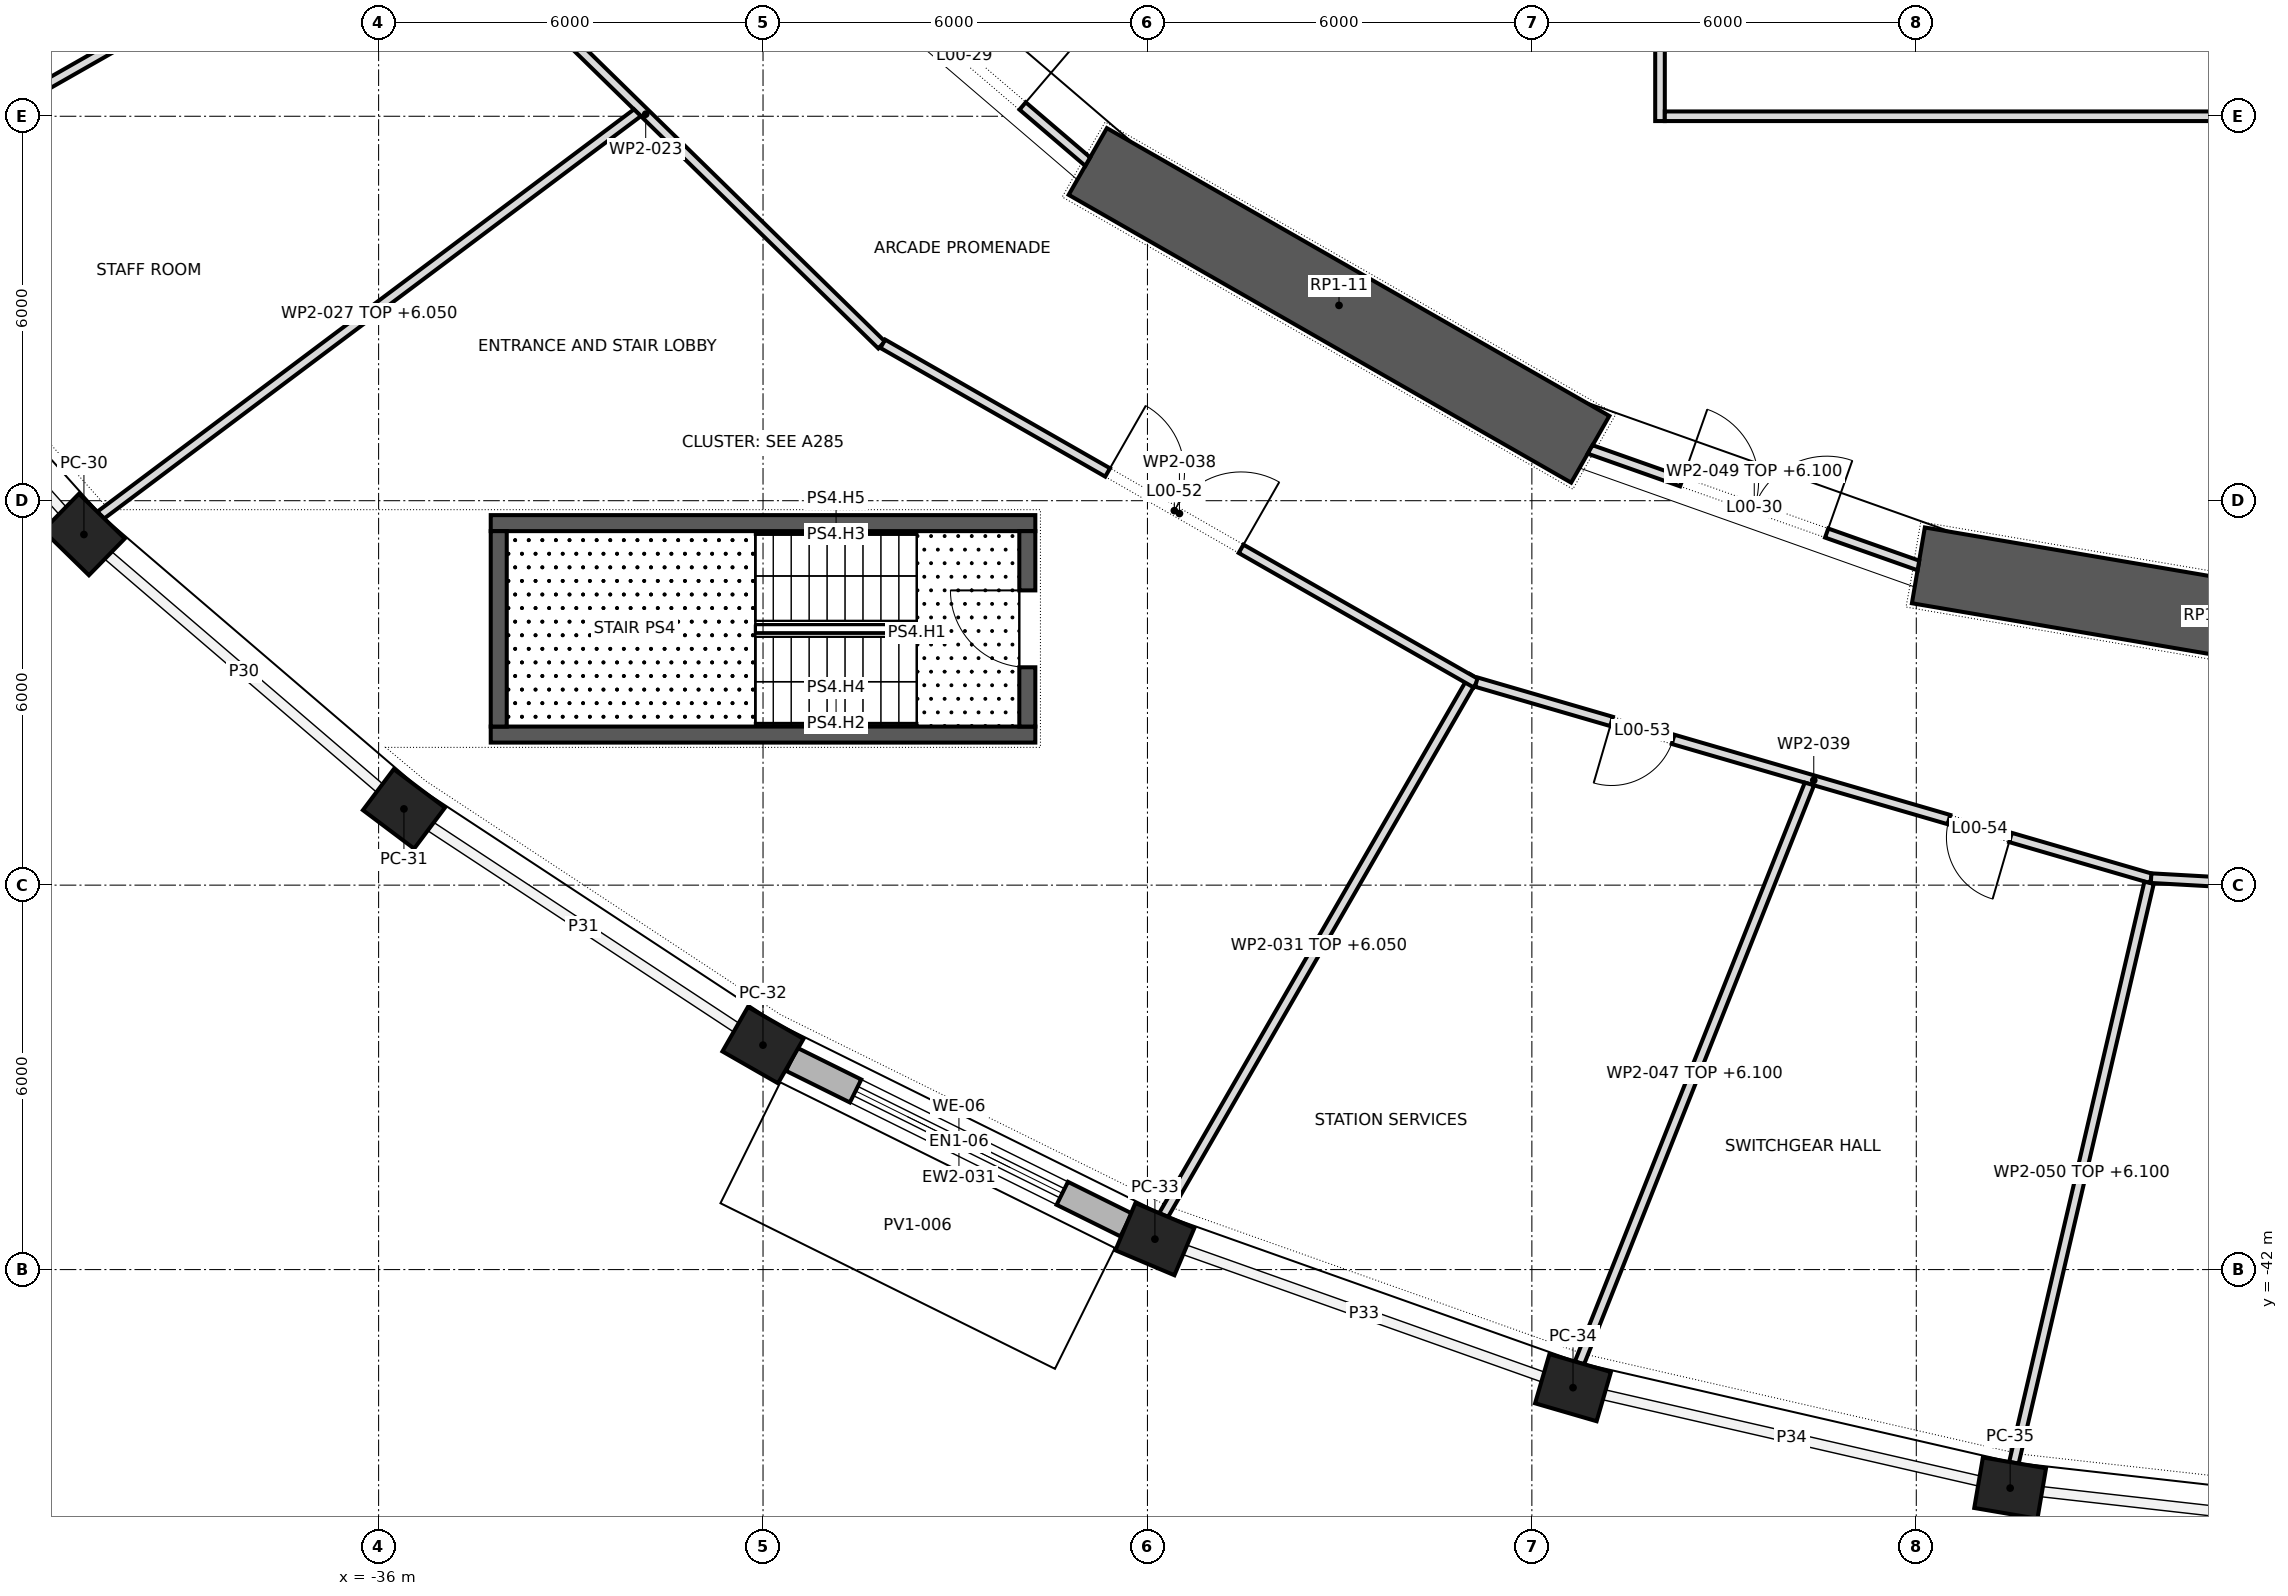
"""IFC4 building model, lengths in metres.
Left out: names, types, materials, properties, quantities, classifications, styles, units other than length and angle.
Written with IfcOpenShell. Run it as: python <this file> out.ifc"""

import sys

from ifc_helpers import new_model, si_unit, direction, frame, frame_2d, origin, origin_2d, place, context, subcontext, project, spatial, polyline, rectangle, outline, extrude, element, fill, save


model = new_model("IFC4")
c1 = context("Model", 3, precision=1e-05, world=origin(), true_north=direction((0.0, 1.0)))
c2 = subcontext(c1, "Body", "Model", "MODEL_VIEW")
j1 = project(units=[si_unit("LENGTHUNIT", "METRE"), si_unit("PLANEANGLEUNIT", "RADIAN")], contexts=[c1])
p1 = place(None, origin())
s1 = spatial("IfcSite", under=j1, at=p1, CompositionType="ELEMENT")
p2 = place(p1, origin())
s2 = spatial("IfcBuilding", under=s1, at=p2, CompositionType="ELEMENT")
p3 = place(p2, origin())
s3 = spatial("IfcBuildingStorey", under=s2, at=p3, CompositionType="ELEMENT", Elevation=0.0)
for number, where, z_axis, x_axis in (
    (1, (-40.599, -30.528, 0.0), (0.0, 0.0, 1.0), (0.715, -0.699, 0.0)),
    (2, (-35.605, -34.81, 0.0), (0.0, 0.0, 1.0), (0.799, -0.601, 0.0)),
    (3, (-30.001, -38.497, 0.0), (0.0, 0.0, 1.0), (0.868, -0.497, 0.0)),
    (4, (-23.884, -41.525, 0.0), (0.0, 0.0, 1.0), (0.921, -0.389, 0.0)),
    (5, (-17.358, -43.843, 0.0), (0.0, 0.0, 1.0), (0.96, -0.279, 0.0)),
    (6, (-10.535, -45.41, 0.0), (0.0, 0.0, 1.0), (0.986, -0.168, 0.0)),
):
    element("IfcColumn", number, at=place(p3, frame(where, z_axis=z_axis, x_axis=x_axis)), inside=s3, PredefinedType="COLUMN", context=c2, shape_type="SweptSolid", body=[
        extrude(rectangle(XDim=1.0, YDim=0.8, at=origin_2d()), origin(), (0.0, 0.0, 1.0), 7.0),
    ])
p4 = place(p3, frame((-24.931, -24.706, 0.0), z_axis=(0.0, 0.0, 1.0), x_axis=(0.867760656864, -0.496982336103, 0.0)))
e7 = element("IfcWall", 7, at=p4, inside=s3, PredefinedType="SHEAR", context=c2, shape_type="SweptSolid", body=[
    extrude(rectangle(XDim=9.038, YDim=1.2, at=frame_2d((4.519, 0.0))), origin(), (0.0, 0.0, 1.0), 7.0),
])
p5 = place(p3, frame((-11.967, -31.009, 0.0), z_axis=(0.0, 0.0, 1.0), x_axis=(0.985776286846, -0.168062822456, 0.0)))
e8 = element("IfcWall", 8, at=p5, inside=s3, PredefinedType="SHEAR", context=c2, shape_type="SweptSolid", body=[
    extrude(rectangle(XDim=9.312, YDim=1.2, at=frame_2d((4.656, 0.0))), origin(), (0.0, 0.0, 1.0), 7.0),
])
p6 = place(p3, frame((-29.553, -38.719, 0.0), z_axis=(0.0, 0.0, 1.0), x_axis=(0.896188687727, -0.443673118399, 0.0)))
e9 = element("IfcWall", 9, at=p6, inside=s3, PredefinedType="STANDARD", context=c2, shape_type="SweptSolid", body=[
    extrude(rectangle(XDim=5.826, YDim=0.4, at=frame_2d((2.913, 0.0))), origin(), (0.0, 0.0, 1.0), 6.2),
])
p7 = place(p6, frame((1.113, 0.0, 0.0)))
e10 = element("IfcOpeningElement", 10, at=p7, cuts=e9, PredefinedType="OPENING", context=c2, shape_type="SweptSolid", body=[
    extrude(rectangle(XDim=3.6, YDim=3.0, at=frame_2d((1.8, 1.5))), frame((0.0, 0.212, 0.0), z_axis=(0.0, -1.0, 0.0), x_axis=(1.0, 0.0, 0.0)), (0.0, 0.0, 1.0), 0.424),
])
p8 = place(p6, frame((1.113, 0.0, 3.45)))
e11 = element("IfcOpeningElement", 11, at=p8, cuts=e9, PredefinedType="OPENING", context=c2, shape_type="SweptSolid", body=[
    extrude(rectangle(XDim=3.6, YDim=2.25, at=frame_2d((1.8, 1.125))), frame((0.0, 0.212, 0.0), z_axis=(0.0, -1.0, 0.0), x_axis=(1.0, 0.0, 0.0)), (0.0, 0.0, 1.0), 0.424),
])
for number, where, z_axis, x_axis in (
    (12, (-34.25, -30.35, 0.0), (0.0, 0.0, 1.0), (1.0, 0.0, 0.0)),
    (13, (-34.25, -33.65, 0.0), (0.0, 0.0, 1.0), (1.0, 0.0, 0.0)),
):
    element("IfcWall", number, at=place(p3, frame(where, z_axis=z_axis, x_axis=x_axis)), inside=s3, PredefinedType="SHEAR", context=c2, shape_type="SweptSolid", body=[
        extrude(rectangle(XDim=8.5, YDim=0.25, at=frame_2d((4.25, 0.0))), origin(), (0.0, 0.0, 1.0), 6.65),
    ])
p9 = place(p3, frame((-34.125, -33.525, 0.0), z_axis=(0.0, 0.0, 1.0), x_axis=(0.0, 1.0, 0.0)))
e14 = element("IfcWall", 14, at=p9, inside=s3, PredefinedType="SHEAR", context=c2, shape_type="SweptSolid", body=[
    extrude(rectangle(XDim=3.05, YDim=0.25, at=frame_2d((1.525, 0.0))), origin(), (0.0, 0.0, 1.0), 6.65),
])
p10 = place(p3, frame((-25.875, -33.525, 0.0), z_axis=(0.0, 0.0, 1.0), x_axis=(0.0, 1.0, 0.0)))
e15 = element("IfcWall", 15, at=p10, inside=s3, PredefinedType="SHEAR", context=c2, shape_type="SweptSolid", body=[
    extrude(rectangle(XDim=3.05, YDim=0.25, at=frame_2d((1.525, 0.0))), origin(), (0.0, 0.0, 1.0), 6.65),
])
p11 = place(p10, frame((0.925, 0.0, 0.0)))
e16 = element("IfcOpeningElement", 16, at=p11, cuts=e15, PredefinedType="OPENING", context=c2, shape_type="SweptSolid", body=[
    extrude(rectangle(XDim=1.2, YDim=2.1, at=frame_2d((0.6, 1.05))), frame((0.0, 0.137, 0.0), z_axis=(0.0, -1.0, 0.0), x_axis=(1.0, 0.0, 0.0)), (0.0, 0.0, 1.0), 0.274),
])
p12 = place(p3, frame((-44.602, -25.456, 0.0), z_axis=(0.0, 0.0, 1.0), x_axis=(0.868872232998, 0.495036405455, 0.0)))
e17 = element("IfcWall", 17, at=p12, inside=s3, PredefinedType="PARTITIONING", context=c2, shape_type="SweptSolid", body=[
    extrude(outline(polyline([(0.011, -0.075), (10.473, -0.075), (10.473, 0.075), (-0.011, 0.075), (0.011, -0.075)])), origin(), (0.0, 0.0, 1.0), 5.897),
])
p13 = place(p3, frame((-35.514, -20.365, 0.0), z_axis=(0.0, 0.0, 1.0), x_axis=(0.714835312925, -0.699292839514, 0.0)))
e18 = element("IfcWall", 18, at=p13, inside=s3, PredefinedType="PARTITIONING", context=c2, shape_type="SweptSolid", body=[
    extrude(rectangle(XDim=10.304, YDim=0.15, at=frame_2d((5.152, 0.0))), origin(), (0.0, 0.0, 1.0), 6.65),
])
p14 = place(p13, frame((2.004, 0.0, 0.0)))
e19 = element("IfcOpeningElement", 19, at=p14, cuts=e18, PredefinedType="OPENING", context=c2, shape_type="SweptSolid", body=[
    extrude(rectangle(XDim=1.0, YDim=2.1, at=frame_2d((0.5, 1.05))), frame((0.0, 0.087, 0.0), z_axis=(0.0, -1.0, 0.0), x_axis=(1.0, 0.0, 0.0)), (0.0, 0.0, 1.0), 0.174),
])
p15 = place(p3, frame((-31.96, -23.945, 0.0), z_axis=(0.0, 0.0, 1.0), x_axis=(-0.800117504973, -0.599843294732, 0.0)))
e20 = element("IfcWall", 20, at=p15, inside=s3, PredefinedType="PARTITIONING", context=c2, shape_type="SweptSolid", body=[
    extrude(outline(polyline([(0.011, -0.075), (10.482, -0.075), (10.459, 0.075), (-0.011, 0.075), (0.011, -0.075)])), origin(), (0.0, 0.0, 1.0), 6.05),
])
p16 = place(p3, frame((-24.932, -24.708, 0.0), z_axis=(0.0, 0.0, 1.0), x_axis=(-0.760084552743, 0.649824185978, 0.0)))
e21 = element("IfcWall", 21, at=p16, inside=s3, PredefinedType="PARTITIONING", context=c2, shape_type="SweptSolid", body=[
    extrude(outline(polyline([(0.014, -0.075), (5.06, -0.075), (5.09, 0.075), (-0.014, 0.075), (0.014, -0.075)])), origin(), (0.0, 0.0, 1.0), 6.1),
])
p17 = place(p16, frame((1.337, 0.0, 0.0)))
e22 = element("IfcOpeningElement", 22, at=p17, cuts=e21, PredefinedType="OPENING", context=c2, shape_type="SweptSolid", body=[
    extrude(rectangle(XDim=2.4, YDim=2.1, at=frame_2d((1.2, 1.05))), frame((0.0, 0.087, 0.0), z_axis=(0.0, -1.0, 0.0), x_axis=(1.0, 0.0, 0.0)), (0.0, 0.0, 1.0), 0.174),
])
p18 = place(p3, frame((-23.748, -41.149, 0.0), z_axis=(0.0, 0.0, 1.0), x_axis=(0.499487181866, 0.866321277097, 0.0)))
e23 = element("IfcWall", 23, at=p18, inside=s3, PredefinedType="PARTITIONING", context=c2, shape_type="SweptSolid", body=[
    extrude(outline(polyline([(0.009, -0.075), (9.703, -0.075), (9.703, 0.075), (-0.009, 0.075), (0.009, -0.075)])), origin(), (0.0, 0.0, 1.0), 6.05),
])
p19 = place(p3, frame((-18.871, -32.85, 0.0), z_axis=(0.0, 0.0, 1.0), x_axis=(-0.867964173254, 0.496626815575, 0.0)))
e24 = element("IfcWall", 24, at=p19, inside=s3, PredefinedType="PARTITIONING", context=c2, shape_type="SweptSolid", body=[
    extrude(rectangle(XDim=10.669, YDim=0.15, at=frame_2d((5.334, 0.0))), origin(), (0.0, 0.0, 1.0), 6.65),
])
p20 = place(p19, frame((4.226, 0.0, 0.0)))
e25 = element("IfcOpeningElement", 25, at=p20, cuts=e24, PredefinedType="OPENING", context=c2, shape_type="SweptSolid", body=[
    extrude(rectangle(XDim=2.4, YDim=2.1, at=frame_2d((1.2, 1.05))), frame((0.0, 0.087, 0.0), z_axis=(0.0, -1.0, 0.0), x_axis=(1.0, 0.0, 0.0)), (0.0, 0.0, 1.0), 0.174),
])
p21 = place(p3, frame((-18.866, -32.832, 0.0), z_axis=(0.0, 0.0, 1.0), x_axis=(0.960211143752, -0.279275060495, 0.0)))
e26 = element("IfcWall", 26, at=p21, inside=s3, PredefinedType="PARTITIONING", context=c2, shape_type="SweptSolid", body=[
    extrude(rectangle(XDim=10.968, YDim=0.15, at=frame_2d((5.484, 0.0))), origin(), (0.0, 0.0, 1.0), 6.65),
])
p22 = place(p21, frame((2.198, 0.0, 0.0)))
e27 = element("IfcOpeningElement", 27, at=p22, cuts=e26, PredefinedType="OPENING", context=c2, shape_type="SweptSolid", body=[
    extrude(rectangle(XDim=1.0, YDim=2.1, at=frame_2d((0.5, 1.05))), frame((0.0, 0.087, 0.0), z_axis=(0.0, -1.0, 0.0), x_axis=(1.0, 0.0, 0.0)), (0.0, 0.0, 1.0), 0.174),
])
p23 = place(p21, frame((7.682, 0.0, 0.0)))
e28 = element("IfcOpeningElement", 28, at=p23, cuts=e26, PredefinedType="OPENING", context=c2, shape_type="SweptSolid", body=[
    extrude(rectangle(XDim=1.0, YDim=2.1, at=frame_2d((0.5, 1.05))), frame((0.0, 0.087, 0.0), z_axis=(0.0, -1.0, 0.0), x_axis=(1.0, 0.0, 0.0)), (0.0, 0.0, 1.0), 0.174),
])
p24 = place(p3, frame((-16.0, -24.075, 0.0), z_axis=(0.0, 0.0, 1.0), x_axis=(0.0, 1.0, 0.0)))
e29 = element("IfcWall", 29, at=p24, inside=s3, PredefinedType="PARTITIONING", context=c2, shape_type="SweptSolid", body=[
    extrude(rectangle(XDim=14.095, YDim=0.15, at=frame_2d((7.047, 0.0))), origin(), (0.0, 0.0, 1.0), 6.65),
])
p25 = place(p24, frame((5.935, 0.0, 0.0)))
e30 = element("IfcOpeningElement", 30, at=p25, cuts=e29, PredefinedType="OPENING", context=c2, shape_type="SweptSolid", body=[
    extrude(rectangle(XDim=2.4, YDim=2.1, at=frame_2d((1.2, 1.05))), frame((0.0, 0.087, 0.0), z_axis=(0.0, -1.0, 0.0), x_axis=(1.0, 0.0, 0.0)), (0.0, 0.0, 1.0), 0.174),
])
p26 = place(p3, frame((-15.925, -24.0, 0.0), z_axis=(0.0, 0.0, 1.0), x_axis=(1.0, 0.0, 0.0)))
e31 = element("IfcWall", 31, at=p26, inside=s3, PredefinedType="PARTITIONING", context=c2, shape_type="SweptSolid", body=[
    extrude(rectangle(XDim=32.0, YDim=0.15, at=frame_2d((16.0, 0.0))), origin(), (0.0, 0.0, 1.0), 6.65),
])
p27 = place(p26, frame((14.725, 0.0, 0.0)))
e32 = element("IfcOpeningElement", 32, at=p27, cuts=e31, PredefinedType="OPENING", context=c2, shape_type="SweptSolid", body=[
    extrude(rectangle(XDim=2.4, YDim=2.1, at=frame_2d((1.2, 1.05))), frame((0.0, 0.087, 0.0), z_axis=(0.0, -1.0, 0.0), x_axis=(1.0, 0.0, 0.0)), (0.0, 0.0, 1.0), 0.174),
])
p28 = place(p3, frame((-13.668, -34.421, 0.0), z_axis=(0.0, 0.0, 1.0), x_axis=(-0.369116523782, -0.929383124374, 0.0)))
e33 = element("IfcWall", 33, at=p28, inside=s3, PredefinedType="PARTITIONING", context=c2, shape_type="SweptSolid", body=[
    extrude(outline(polyline([(0.007, -0.075), (9.729, -0.075), (9.715, 0.075), (-0.007, 0.075), (0.007, -0.075)])), origin(), (0.0, 0.0, 1.0), 6.1),
])
p29 = place(p3, frame((-11.967, -31.011, 0.0), z_axis=(0.0, 0.0, 1.0), x_axis=(-0.942814385805, 0.333318217204, 0.0)))
e34 = element("IfcWall", 34, at=p29, inside=s3, PredefinedType="PARTITIONING", context=c2, shape_type="SweptSolid", body=[
    extrude(outline(polyline([(0.013, -0.075), (5.421, -0.075), (5.448, 0.075), (-0.013, 0.075), (0.013, -0.075)])), origin(), (0.0, 0.0, 1.0), 6.1),
])
p30 = place(p29, frame((1.519, 0.0, 0.0)))
e35 = element("IfcOpeningElement", 35, at=p30, cuts=e34, PredefinedType="OPENING", context=c2, shape_type="SweptSolid", body=[
    extrude(rectangle(XDim=2.4, YDim=2.1, at=frame_2d((1.2, 1.05))), frame((0.0, 0.087, 0.0), z_axis=(0.0, -1.0, 0.0), x_axis=(1.0, 0.0, 0.0)), (0.0, 0.0, 1.0), 0.174),
])
p31 = place(p3, frame((-8.367, -35.963, 0.0), z_axis=(0.0, 0.0, 1.0), x_axis=(-0.226936502248, -0.973909556349, 0.0)))
e36 = element("IfcWall", 36, at=p31, inside=s3, PredefinedType="PARTITIONING", context=c2, shape_type="SweptSolid", body=[
    extrude(outline(polyline([(0.0, -0.075), (9.299, -0.075), (9.291, 0.075), (0.0, 0.075), (0.0, -0.075)])), origin(), (0.0, 0.0, 1.0), 6.1),
])
p32 = place(p3, frame((2.816, -36.521, 0.0), z_axis=(0.0, 0.0, 1.0), x_axis=(-0.998407170401, 0.056419164225, 0.0)))
e37 = element("IfcWall", 37, at=p32, inside=s3, PredefinedType="PARTITIONING", context=c2, shape_type="SweptSolid", body=[
    extrude(rectangle(XDim=11.169, YDim=0.15, at=frame_2d((5.584, 0.0))), origin(), (0.0, 0.0, 1.0), 6.65),
])
p33 = place(p32, frame((5.1, 0.0, 0.0)))
e38 = element("IfcOpeningElement", 38, at=p33, cuts=e37, PredefinedType="OPENING", context=c2, shape_type="SweptSolid", body=[
    extrude(rectangle(XDim=1.0, YDim=2.1, at=frame_2d((0.5, 1.05))), frame((0.0, 0.087, 0.0), z_axis=(0.0, -1.0, 0.0), x_axis=(1.0, 0.0, 0.0)), (0.0, 0.0, 1.0), 0.174),
])
p34 = place(p7, frame((3.6, 0.0, 0.0), z_axis=(0.0, 0.0, 1.0), x_axis=(-1.0, 0.0, 0.0)))
e39 = element("IfcDoor", 39, at=p34, inside=s3, OperationType="DOUBLE_DOOR_SLIDING", PredefinedType="DOOR", context=c2, shape_type="SweptSolid", body=[
    extrude(rectangle(XDim=3.6, YDim=3.0, at=frame_2d((1.8, 1.5))), frame((0.0, 0.025, 0.0), z_axis=(0.0, -1.0, 0.0), x_axis=(1.0, 0.0, 0.0)), (0.0, 0.0, 1.0), 0.05),
])
fill(e10, e39)
p35 = place(p8, origin())
e40 = element("IfcWindow", 40, at=p35, inside=s3, PartitioningType="TRIPLE_PANEL_VERTICAL", PredefinedType="WINDOW", context=c2, shape_type="SweptSolid", body=[
    extrude(rectangle(XDim=3.6, YDim=2.25, at=frame_2d((1.8, 1.125))), frame((0.0, 0.03, 0.0), z_axis=(0.0, -1.0, 0.0), x_axis=(1.0, 0.0, 0.0)), (0.0, 0.0, 1.0), 0.06),
])
fill(e11, e40)
p36 = place(p11, origin())
e41 = element("IfcDoor", 41, at=p36, inside=s3, OperationType="SINGLE_SWING_LEFT", PredefinedType="DOOR", context=c2, shape_type="SweptSolid", body=[
    extrude(rectangle(XDim=1.2, YDim=2.1, at=frame_2d((0.6, 1.05))), frame((0.0, 0.025, 0.0), z_axis=(0.0, -1.0, 0.0), x_axis=(1.0, 0.0, 0.0)), (0.0, 0.0, 1.0), 0.05),
])
fill(e16, e41)
p37 = place(p17, frame((2.4, 0.0, 0.0), z_axis=(0.0, 0.0, 1.0), x_axis=(-1.0, 0.0, 0.0)))
e42 = element("IfcDoor", 42, at=p37, inside=s3, OperationType="DOUBLE_DOOR_SINGLE_SWING", PredefinedType="DOOR", context=c2, shape_type="SweptSolid", body=[
    extrude(rectangle(XDim=2.4, YDim=2.1, at=frame_2d((1.2, 1.05))), frame((0.0, 0.025, 0.0), z_axis=(0.0, -1.0, 0.0), x_axis=(1.0, 0.0, 0.0)), (0.0, 0.0, 1.0), 0.05),
])
fill(e22, e42)
p38 = place(p30, frame((2.4, 0.0, 0.0), z_axis=(0.0, 0.0, 1.0), x_axis=(-1.0, 0.0, 0.0)))
e43 = element("IfcDoor", 43, at=p38, inside=s3, OperationType="DOUBLE_DOOR_SINGLE_SWING", PredefinedType="DOOR", context=c2, shape_type="SweptSolid", body=[
    extrude(rectangle(XDim=2.4, YDim=2.1, at=frame_2d((1.2, 1.05))), frame((0.0, 0.025, 0.0), z_axis=(0.0, -1.0, 0.0), x_axis=(1.0, 0.0, 0.0)), (0.0, 0.0, 1.0), 0.05),
])
fill(e35, e43)
p39 = place(p20, frame((2.4, 0.0, 0.0), z_axis=(0.0, 0.0, 1.0), x_axis=(-1.0, 0.0, 0.0)))
e44 = element("IfcDoor", 44, at=p39, inside=s3, OperationType="DOUBLE_DOOR_SINGLE_SWING", PredefinedType="DOOR", context=c2, shape_type="SweptSolid", body=[
    extrude(rectangle(XDim=2.4, YDim=2.1, at=frame_2d((1.2, 1.05))), frame((0.0, 0.025, 0.0), z_axis=(0.0, -1.0, 0.0), x_axis=(1.0, 0.0, 0.0)), (0.0, 0.0, 1.0), 0.05),
])
fill(e25, e44)
p40 = place(p22, frame((1.0, 0.0, 0.0), z_axis=(0.0, 0.0, 1.0), x_axis=(-1.0, 0.0, 0.0)))
e45 = element("IfcDoor", 45, at=p40, inside=s3, OperationType="SINGLE_SWING_LEFT", PredefinedType="DOOR", context=c2, shape_type="SweptSolid", body=[
    extrude(rectangle(XDim=1.0, YDim=2.1, at=frame_2d((0.5, 1.05))), frame((0.0, 0.025, 0.0), z_axis=(0.0, -1.0, 0.0), x_axis=(1.0, 0.0, 0.0)), (0.0, 0.0, 1.0), 0.05),
])
fill(e27, e45)
p41 = place(p23, frame((1.0, 0.0, 0.0), z_axis=(0.0, 0.0, 1.0), x_axis=(-1.0, 0.0, 0.0)))
e46 = element("IfcDoor", 46, at=p41, inside=s3, OperationType="SINGLE_SWING_RIGHT", PredefinedType="DOOR", context=c2, shape_type="SweptSolid", body=[
    extrude(rectangle(XDim=1.0, YDim=2.1, at=frame_2d((0.5, 1.05))), frame((0.0, 0.025, 0.0), z_axis=(0.0, -1.0, 0.0), x_axis=(1.0, 0.0, 0.0)), (0.0, 0.0, 1.0), 0.05),
])
fill(e28, e46)
save(model, sys.argv[1])
